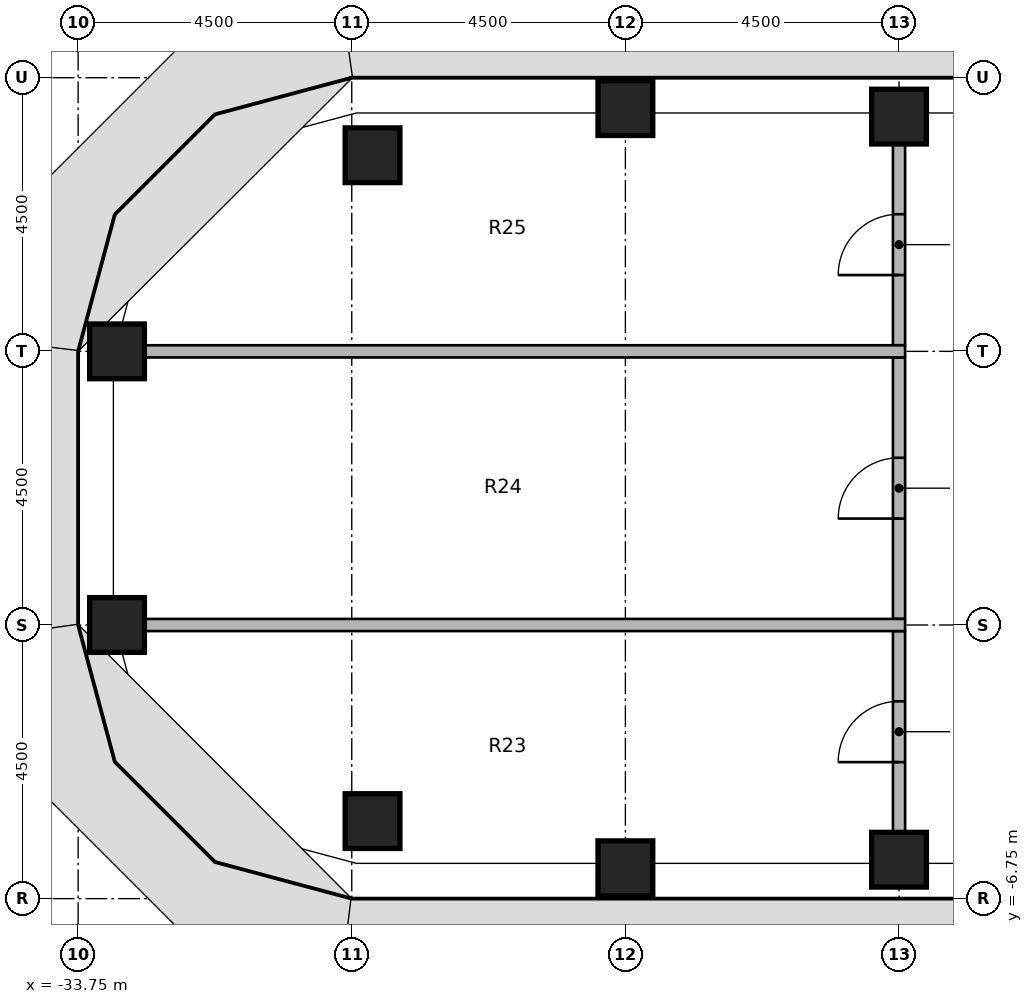
"""IFC4 building model, lengths in metres.
Left out: names, types, materials, properties, quantities, classifications, styles, units other than length and angle.
Written with IfcOpenShell. Run it as: python <this file> out.ifc"""

import sys

from ifc_helpers import new_model, si_unit, direction, frame, frame_2d, origin, origin_2d, place, context, subcontext, project, spatial, rectangle, extrude, element, fill, save


model = new_model("IFC4")
c1 = context("Model", 3, precision=1e-05, world=origin(), true_north=direction((0.0, 1.0)))
c2 = subcontext(c1, "Body", "Model", "MODEL_VIEW")
j1 = project(units=[si_unit("LENGTHUNIT", "METRE"), si_unit("PLANEANGLEUNIT", "RADIAN")], contexts=[c1])
p1 = place(None, origin())
s1 = spatial("IfcSite", under=j1, at=p1, CompositionType="ELEMENT")
p2 = place(p1, origin())
s2 = spatial("IfcBuilding", under=s1, at=p2, CompositionType="ELEMENT")
p3 = place(p2, frame((0.0, 0.0, 98.0)))
s3 = spatial("IfcBuildingStorey", under=s2, at=p3, CompositionType="ELEMENT", Elevation=98.0)
for number, where, z_axis, x_axis in (
    (1, (-33.11, -2.25, 0.0), (0.0, 0.0, 1.0), (1.0, 0.0, 0.0)),
    (2, (-33.11, 2.25, 0.0), (0.0, 0.0, 1.0), (1.0, 0.0, 0.0)),
    (3, (-28.908, -5.475, 0.0), (0.0, 0.0, 1.0), (1.0, 0.0, 0.0)),
    (4, (-28.908, 5.475, 0.0), (0.0, 0.0, 1.0), (1.0, 0.0, 0.0)),
    (5, (-24.75, -6.25, 0.0), (0.0, 0.0, 1.0), (1.0, 0.0, 0.0)),
    (6, (-24.75, 6.25, 0.0), (0.0, 0.0, 1.0), (1.0, 0.0, 0.0)),
    (7, (-20.25, -6.11, 0.0), (0.0, 0.0, 1.0), (1.0, 0.0, 0.0)),
    (8, (-20.25, 6.11, 0.0), (0.0, 0.0, 1.0), (1.0, 0.0, 0.0)),
):
    element("IfcColumn", number, at=place(p3, frame(where, z_axis=z_axis, x_axis=x_axis)), inside=s3, PredefinedType="COLUMN", context=c2, shape_type="SweptSolid", body=[
        extrude(rectangle(XDim=0.9, YDim=0.9, at=origin_2d()), origin(), (0.0, 0.0, 1.0), 3.65),
    ])
p4 = place(p3, frame((-20.25, -5.66, 0.0), z_axis=(0.0, 0.0, 1.0), x_axis=(0.0, 1.0, 0.0)))
e9 = element("IfcWall", 9, at=p4, inside=s3, PredefinedType="PARTITIONING", context=c2, shape_type="SweptSolid", body=[
    extrude(rectangle(XDim=3.31, YDim=0.2, at=frame_2d((1.655, 0.0))), origin(), (0.0, 0.0, 1.0), 2.738),
])
p5 = place(p4, frame((1.155, 0.0, 0.0)))
e10 = element("IfcOpeningElement", 10, at=p5, cuts=e9, PredefinedType="OPENING", context=c2, shape_type="SweptSolid", body=[
    extrude(rectangle(XDim=1.0, YDim=2.1, at=frame_2d((0.5, 1.05))), frame((0.0, 0.11, 0.0), z_axis=(0.0, -1.0, 0.0), x_axis=(1.0, 0.0, 0.0)), (0.0, 0.0, 1.0), 0.22),
])
p6 = place(p3, frame((-20.25, -2.15, 0.0), z_axis=(0.0, 0.0, 1.0), x_axis=(0.0, 1.0, 0.0)))
e11 = element("IfcWall", 11, at=p6, inside=s3, PredefinedType="PARTITIONING", context=c2, shape_type="SweptSolid", body=[
    extrude(rectangle(XDim=4.3, YDim=0.2, at=frame_2d((2.15, 0.0))), origin(), (0.0, 0.0, 1.0), 2.738),
])
p7 = place(p6, frame((1.65, 0.0, 0.0)))
e12 = element("IfcOpeningElement", 12, at=p7, cuts=e11, PredefinedType="OPENING", context=c2, shape_type="SweptSolid", body=[
    extrude(rectangle(XDim=1.0, YDim=2.1, at=frame_2d((0.5, 1.05))), frame((0.0, 0.11, 0.0), z_axis=(0.0, -1.0, 0.0), x_axis=(1.0, 0.0, 0.0)), (0.0, 0.0, 1.0), 0.22),
])
p8 = place(p3, frame((-20.25, 2.35, 0.0), z_axis=(0.0, 0.0, 1.0), x_axis=(0.0, 1.0, 0.0)))
e13 = element("IfcWall", 13, at=p8, inside=s3, PredefinedType="PARTITIONING", context=c2, shape_type="SweptSolid", body=[
    extrude(rectangle(XDim=3.31, YDim=0.2, at=frame_2d((1.655, 0.0))), origin(), (0.0, 0.0, 1.0), 2.738),
])
p9 = place(p8, frame((1.155, 0.0, 0.0)))
e14 = element("IfcOpeningElement", 14, at=p9, cuts=e13, PredefinedType="OPENING", context=c2, shape_type="SweptSolid", body=[
    extrude(rectangle(XDim=1.0, YDim=2.1, at=frame_2d((0.5, 1.05))), frame((0.0, 0.11, 0.0), z_axis=(0.0, -1.0, 0.0), x_axis=(1.0, 0.0, 0.0)), (0.0, 0.0, 1.0), 0.22),
])
for number, where, z_axis, x_axis in (
    (15, (-32.66, -2.25, 0.0), (0.0, 0.0, 1.0), (1.0, 0.0, 0.0)),
    (16, (-32.66, 2.25, 0.0), (0.0, 0.0, 1.0), (1.0, 0.0, 0.0)),
):
    element("IfcWall", number, at=place(p3, frame(where, z_axis=z_axis, x_axis=x_axis)), inside=s3, PredefinedType="PARTITIONING", context=c2, shape_type="SweptSolid", body=[
        extrude(rectangle(XDim=12.51, YDim=0.2, at=frame_2d((6.255, 0.0))), origin(), (0.0, 0.0, 1.0), 2.738),
    ])
p10 = place(p5, origin())
e17 = element("IfcDoor", 17, at=p10, inside=s3, OperationType="SINGLE_SWING_RIGHT", PredefinedType="DOOR", context=c2, shape_type="SweptSolid", body=[
    extrude(rectangle(XDim=1.0, YDim=2.1, at=frame_2d((0.5, 1.05))), frame((0.0, 0.025, 0.0), z_axis=(0.0, -1.0, 0.0), x_axis=(1.0, 0.0, 0.0)), (0.0, 0.0, 1.0), 0.05),
])
fill(e10, e17)
p11 = place(p7, origin())
e18 = element("IfcDoor", 18, at=p11, inside=s3, OperationType="SINGLE_SWING_RIGHT", PredefinedType="DOOR", context=c2, shape_type="SweptSolid", body=[
    extrude(rectangle(XDim=1.0, YDim=2.1, at=frame_2d((0.5, 1.05))), frame((0.0, 0.025, 0.0), z_axis=(0.0, -1.0, 0.0), x_axis=(1.0, 0.0, 0.0)), (0.0, 0.0, 1.0), 0.05),
])
fill(e12, e18)
p12 = place(p9, origin())
e19 = element("IfcDoor", 19, at=p12, inside=s3, OperationType="SINGLE_SWING_LEFT", PredefinedType="DOOR", context=c2, shape_type="SweptSolid", body=[
    extrude(rectangle(XDim=1.0, YDim=2.1, at=frame_2d((0.5, 1.05))), frame((0.0, 0.025, 0.0), z_axis=(0.0, -1.0, 0.0), x_axis=(1.0, 0.0, 0.0)), (0.0, 0.0, 1.0), 0.05),
])
fill(e14, e19)
save(model, sys.argv[1])
